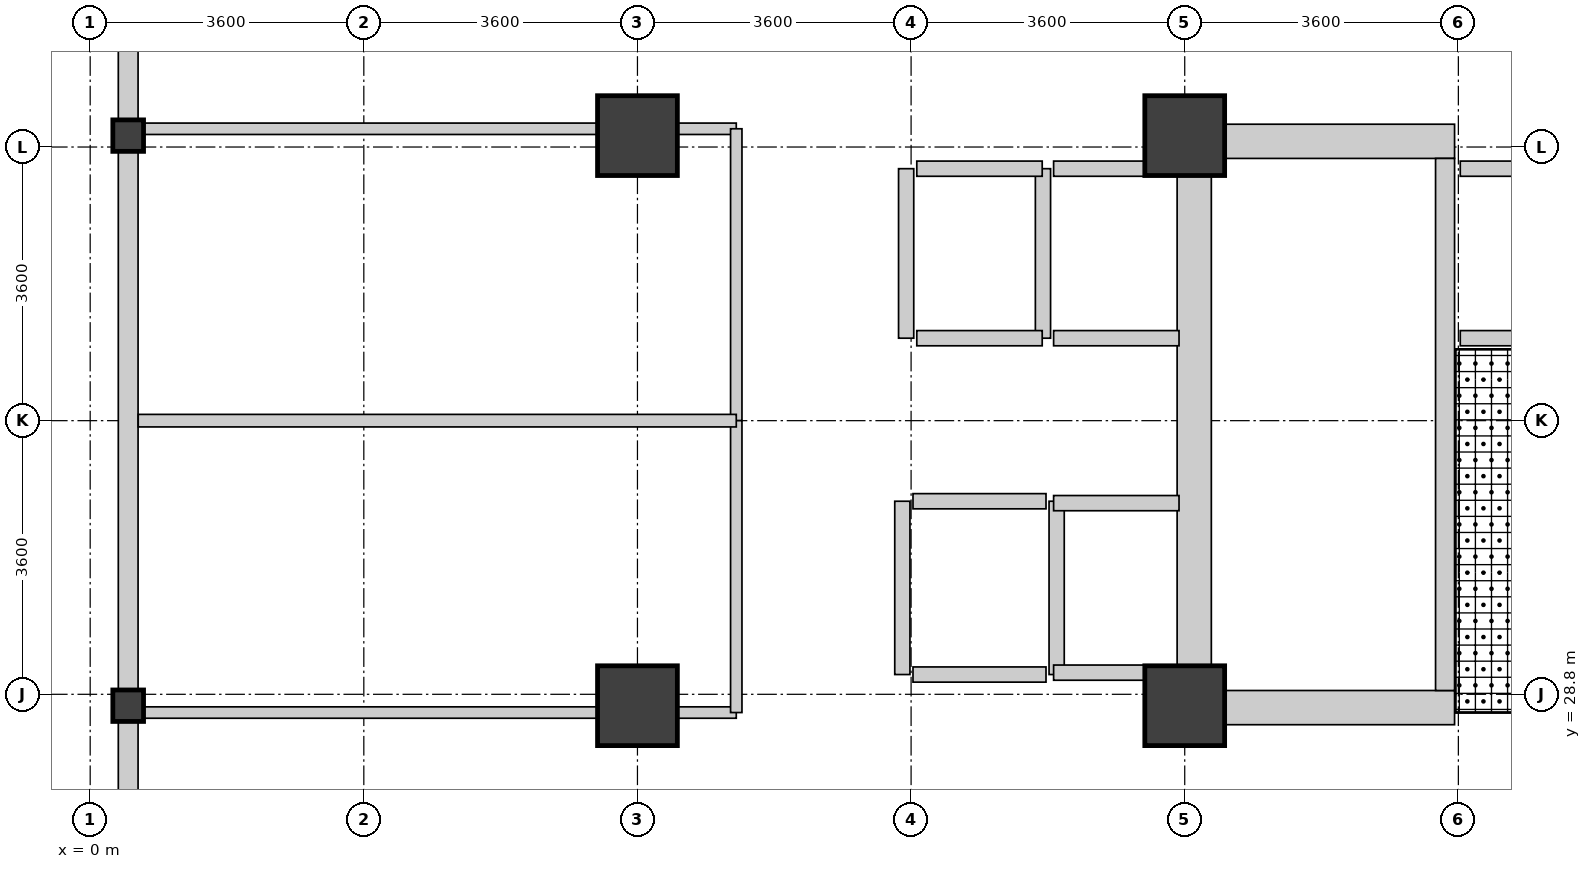
"""IFC4 building model, lengths in metres.
Left out: names, types, materials, properties, quantities, classifications, styles, units other than length and angle.
Written with IfcOpenShell. Run it as: python <this file> out.ifc"""

import sys

from ifc_helpers import new_model, si_unit, direction, frame, frame_2d, origin, origin_2d, place, context, subcontext, project, spatial, rectangle, i_section, extrude, source, transform, mapped, element, fill, save


model = new_model("IFC4")
c1 = context("Model", 3, precision=1e-05, world=origin(), true_north=direction((0.0, 1.0)))
c2 = subcontext(c1, "Body", "Model", "MODEL_VIEW")
j1 = project(units=[si_unit("LENGTHUNIT", "METRE"), si_unit("PLANEANGLEUNIT", "RADIAN")], contexts=[c1])
p1 = place(None, origin())
s1 = spatial("IfcSite", under=j1, at=p1, CompositionType="ELEMENT")
p2 = place(p1, origin())
s2 = spatial("IfcBuilding", under=s1, at=p2, CompositionType="ELEMENT")
p3 = place(p2, frame((0.0, 0.0, 135.6)))
s3 = spatial("IfcBuildingStorey", under=s2, at=p3, CompositionType="ELEMENT", Elevation=135.6)
p4 = place(p3, frame((14.525, 28.4, 0.0), z_axis=(0.0, 0.0, 1.0), x_axis=(0.0, 1.0, 0.0)))
e1 = element("IfcWall", 1, at=p4, inside=s3, PredefinedType="SHEAR", context=c2, shape_type="SweptSolid", body=[
    extrude(rectangle(XDim=7.9, YDim=0.45, at=frame_2d((3.95, 0.0))), origin(), (0.0, 0.0, 1.0), 4.36),
])
for number, where, z_axis, x_axis in (
    (2, (14.75, 28.625, 0.0), (0.0, 0.0, 1.0), (1.0, 0.0, 0.0)),
    (3, (14.75, 36.075, 0.0), (0.0, 0.0, 1.0), (1.0, 0.0, 0.0)),
):
    element("IfcWall", number, at=place(p3, frame(where, z_axis=z_axis, x_axis=x_axis)), inside=s3, PredefinedType="SHEAR", context=c2, shape_type="SweptSolid", body=[
        extrude(rectangle(XDim=3.2, YDim=0.45, at=frame_2d((1.6, 0.0))), origin(), (0.0, 0.0, 1.0), 4.36),
    ])
p5 = place(p3, frame((17.825, 28.85, 0.0), z_axis=(0.0, 0.0, 1.0), x_axis=(0.0, 1.0, 0.0)))
e4 = element("IfcWall", 4, at=p5, inside=s3, PredefinedType="SHEAR", context=c2, shape_type="SweptSolid", body=[
    extrude(rectangle(XDim=7.0, YDim=0.25, at=frame_2d((3.5, 0.0))), origin(), (0.0, 0.0, 1.0), 4.36),
])
p6 = place(p5, frame((0.15, 0.0, 0.0)))
e5 = element("IfcOpeningElement", 5, at=p6, cuts=e4, PredefinedType="OPENING", context=c2, shape_type="SweptSolid", body=[
    extrude(rectangle(XDim=1.1, YDim=2.08, at=frame_2d((0.55, 1.04))), frame((0.0, 0.135, 0.0), z_axis=(0.0, -1.0, 0.0), x_axis=(1.0, 0.0, 0.0)), (0.0, 0.0, 1.0), 0.27),
])
m1 = source(origin(), c2, "Body", "SweptSolid", [
    extrude(rectangle(XDim=1.05, YDim=1.05, at=origin_2d()), origin(), (0.0, 0.0, 1.0), 4.6),
])
for number, where, z_axis, x_axis in (
    (6, (7.2, 28.65, 0.0), (0.0, 0.0, 1.0), (1.0, 0.0, 0.0)),
    (7, (7.2, 36.15, 0.0), (0.0, 0.0, 1.0), (1.0, 0.0, 0.0)),
    (8, (14.4, 28.65, 0.0), (0.0, 0.0, 1.0), (1.0, 0.0, 0.0)),
    (9, (14.4, 36.15, 0.0), (0.0, 0.0, 1.0), (1.0, 0.0, 0.0)),
):
    element("IfcColumn", number, at=place(p3, frame(where, z_axis=z_axis, x_axis=x_axis)), inside=s3, PredefinedType="COLUMN", context=c2, shape_type="MappedRepresentation", body=[
        mapped(m1, transform((0.0, 0.0, 0.0), x_axis=(1.0, 0.0, 0.0), y_axis=(0.0, 1.0, 0.0), z_axis=(0.0, 0.0, 1.0), scale=1.0)),
    ])
m2 = source(origin(), c2, "Body", "SweptSolid", [
    extrude(i_section(OverallWidth=0.404, OverallDepth=0.414, WebThickness=0.021, FlangeThickness=0.028, FilletRadius=0.015, at=origin_2d()), origin(), (0.0, 0.0, 1.0), 4.6),
])
for number, where, z_axis, x_axis in (
    (10, (0.5, 28.65, 0.0), (0.0, 0.0, 1.0), (1.0, 0.0, 0.0)),
    (11, (0.5, 36.15, 0.0), (0.0, 0.0, 1.0), (1.0, 0.0, 0.0)),
):
    element("IfcColumn", number, at=place(p3, frame(where, z_axis=z_axis, x_axis=x_axis)), inside=s3, PredefinedType="COLUMN", context=c2, shape_type="MappedRepresentation", body=[
        mapped(m2, transform((0.0, 0.0, 0.0), x_axis=(1.0, 0.0, 0.0), y_axis=(0.0, 1.0, 0.0), z_axis=(0.0, 0.0, 1.0), scale=1.0)),
    ])
p7 = place(p3, frame((0.5, 36.358, 0.0), z_axis=(0.0, 0.0, 1.0), x_axis=(0.0, 1.0, 0.0)))
e12 = element("IfcWall", 12, at=p7, inside=s3, PredefinedType="STANDARD", context=c2, shape_type="SweptSolid", body=[
    extrude(rectangle(XDim=6.972, YDim=0.26, at=frame_2d((3.486, 0.0))), origin(), (0.0, 0.0, 1.0), 4.34),
])
p8 = place(p7, frame((3.879, 0.0, 0.85)))
e13 = element("IfcOpeningElement", 13, at=p8, cuts=e12, PredefinedType="OPENING", context=c2, shape_type="SweptSolid", body=[
    extrude(rectangle(XDim=2.7, YDim=2.05, at=frame_2d((1.35, 1.025))), frame((0.0, 0.14, 0.0), z_axis=(0.0, -1.0, 0.0), x_axis=(1.0, 0.0, 0.0)), (0.0, 0.0, 1.0), 0.28),
])
p9 = place(p7, frame((2.453, 0.0, 0.85)))
e14 = element("IfcOpeningElement", 14, at=p9, cuts=e12, PredefinedType="OPENING", context=c2, shape_type="SweptSolid", body=[
    extrude(rectangle(XDim=0.95, YDim=1.75, at=frame_2d((0.475, 0.875))), frame((0.0, 0.14, 0.0), z_axis=(0.0, -1.0, 0.0), x_axis=(1.0, 0.0, 0.0)), (0.0, 0.0, 1.0), 0.28),
])
p10 = place(p3, frame((0.5, 28.858, 0.0), z_axis=(0.0, 0.0, 1.0), x_axis=(0.0, 1.0, 0.0)))
e15 = element("IfcWall", 15, at=p10, inside=s3, PredefinedType="STANDARD", context=c2, shape_type="SweptSolid", body=[
    extrude(rectangle(XDim=7.084, YDim=0.26, at=frame_2d((3.542, 0.0))), origin(), (0.0, 0.0, 1.0), 3.89),
])
p11 = place(p10, frame((0.421, 0.0, 0.85)))
e16 = element("IfcOpeningElement", 16, at=p11, cuts=e15, PredefinedType="OPENING", context=c2, shape_type="SweptSolid", body=[
    extrude(rectangle(XDim=2.7, YDim=2.05, at=frame_2d((1.35, 1.025))), frame((0.0, 0.14, 0.0), z_axis=(0.0, -1.0, 0.0), x_axis=(1.0, 0.0, 0.0)), (0.0, 0.0, 1.0), 0.28),
])
p12 = place(p10, frame((3.963, 0.0, 0.85)))
e17 = element("IfcOpeningElement", 17, at=p12, cuts=e15, PredefinedType="OPENING", context=c2, shape_type="SweptSolid", body=[
    extrude(rectangle(XDim=2.7, YDim=2.05, at=frame_2d((1.35, 1.025))), frame((0.0, 0.14, 0.0), z_axis=(0.0, -1.0, 0.0), x_axis=(1.0, 0.0, 0.0)), (0.0, 0.0, 1.0), 0.28),
])
p13 = place(p3, frame((0.5, 21.47, 0.0), z_axis=(0.0, 0.0, 1.0), x_axis=(0.0, 1.0, 0.0)))
e18 = element("IfcWall", 18, at=p13, inside=s3, PredefinedType="STANDARD", context=c2, shape_type="SweptSolid", body=[
    extrude(rectangle(XDim=6.972, YDim=0.26, at=frame_2d((3.486, 0.0))), origin(), (0.0, 0.0, 1.0), 4.34),
])
p14 = place(p13, frame((0.393, 0.0, 0.85)))
e19 = element("IfcOpeningElement", 19, at=p14, cuts=e18, PredefinedType="OPENING", context=c2, shape_type="SweptSolid", body=[
    extrude(rectangle(XDim=2.7, YDim=2.05, at=frame_2d((1.35, 1.025))), frame((0.0, 0.14, 0.0), z_axis=(0.0, -1.0, 0.0), x_axis=(1.0, 0.0, 0.0)), (0.0, 0.0, 1.0), 0.28),
])
p15 = place(p13, frame((3.569, 0.0, 0.85)))
e20 = element("IfcOpeningElement", 20, at=p15, cuts=e18, PredefinedType="OPENING", context=c2, shape_type="SweptSolid", body=[
    extrude(rectangle(XDim=0.95, YDim=1.75, at=frame_2d((0.475, 0.875))), frame((0.0, 0.14, 0.0), z_axis=(0.0, -1.0, 0.0), x_axis=(1.0, 0.0, 0.0)), (0.0, 0.0, 1.0), 0.28),
])
p16 = place(p3, frame((18.025, 33.485, 0.0), z_axis=(0.0, 0.0, 1.0), x_axis=(1.0, 0.0, 0.0)))
e21 = element("IfcWall", 21, at=p16, inside=s3, PredefinedType="PARTITIONING", context=c2, shape_type="SweptSolid", body=[
    extrude(rectangle(XDim=1.65, YDim=0.2, at=frame_2d((0.825, 0.0))), origin(), (0.0, 0.0, 1.0), 4.34),
])
p17 = place(p16, frame((0.275, 0.0, 0.0)))
e22 = element("IfcOpeningElement", 22, at=p17, cuts=e21, PredefinedType="OPENING", context=c2, shape_type="SweptSolid", body=[
    extrude(rectangle(XDim=1.1, YDim=2.12, at=frame_2d((0.55, 1.06))), frame((0.0, 0.11, 0.0), z_axis=(0.0, -1.0, 0.0), x_axis=(1.0, 0.0, 0.0)), (0.0, 0.0, 1.0), 0.22),
])
p18 = place(p3, frame((18.025, 35.715, 0.0), z_axis=(0.0, 0.0, 1.0), x_axis=(1.0, 0.0, 0.0)))
e23 = element("IfcWall", 23, at=p18, inside=s3, PredefinedType="PARTITIONING", context=c2, shape_type="SweptSolid", body=[
    extrude(rectangle(XDim=1.65, YDim=0.2, at=frame_2d((0.825, 0.0))), origin(), (0.0, 0.0, 1.0), 3.34),
])
p19 = place(p3, frame((10.825, 29.06, 0.0), z_axis=(0.0, 0.0, 1.0), x_axis=(1.0, 0.0, 0.0)))
e24 = element("IfcWall", 24, at=p19, inside=s3, PredefinedType="PARTITIONING", context=c2, shape_type="SweptSolid", body=[
    extrude(rectangle(XDim=1.75, YDim=0.2, at=frame_2d((0.875, 0.0))), origin(), (0.0, 0.0, 1.0), 4.34),
])
p20 = place(p3, frame((10.825, 31.34, 0.0), z_axis=(0.0, 0.0, 1.0), x_axis=(1.0, 0.0, 0.0)))
e25 = element("IfcWall", 25, at=p20, inside=s3, PredefinedType="PARTITIONING", context=c2, shape_type="SweptSolid", body=[
    extrude(rectangle(XDim=1.75, YDim=0.2, at=frame_2d((0.875, 0.0))), origin(), (0.0, 0.0, 1.0), 4.34),
])
p21 = place(p20, frame((0.325, 0.0, 0.0)))
e26 = element("IfcOpeningElement", 26, at=p21, cuts=e25, PredefinedType="OPENING", context=c2, shape_type="SweptSolid", body=[
    extrude(rectangle(XDim=1.1, YDim=2.12, at=frame_2d((0.55, 1.06))), frame((0.0, 0.11, 0.0), z_axis=(0.0, -1.0, 0.0), x_axis=(1.0, 0.0, 0.0)), (0.0, 0.0, 1.0), 0.22),
])
for number, where, z_axis, x_axis in (
    (27, (10.685, 29.06, 0.0), (0.0, 0.0, 1.0), (0.0, 1.0, 0.0)),
    (28, (12.715, 29.06, 0.0), (0.0, 0.0, 1.0), (0.0, 1.0, 0.0)),
):
    element("IfcWall", number, at=place(p3, frame(where, z_axis=z_axis, x_axis=x_axis)), inside=s3, PredefinedType="PARTITIONING", context=c2, shape_type="SweptSolid", body=[
        extrude(rectangle(XDim=2.28, YDim=0.2, at=frame_2d((1.14, 0.0))), origin(), (0.0, 0.0, 1.0), 4.34),
    ])
p22 = place(p3, frame((12.675, 33.485, 0.0), z_axis=(0.0, 0.0, 1.0), x_axis=(1.0, 0.0, 0.0)))
e29 = element("IfcWall", 29, at=p22, inside=s3, PredefinedType="PARTITIONING", context=c2, shape_type="SweptSolid", body=[
    extrude(rectangle(XDim=1.65, YDim=0.2, at=frame_2d((0.825, 0.0))), origin(), (0.0, 0.0, 1.0), 4.34),
])
p23 = place(p22, frame((0.275, 0.0, 0.0)))
e30 = element("IfcOpeningElement", 30, at=p23, cuts=e29, PredefinedType="OPENING", context=c2, shape_type="SweptSolid", body=[
    extrude(rectangle(XDim=1.1, YDim=2.12, at=frame_2d((0.55, 1.06))), frame((0.0, 0.11, 0.0), z_axis=(0.0, -1.0, 0.0), x_axis=(1.0, 0.0, 0.0)), (0.0, 0.0, 1.0), 0.22),
])
p24 = place(p3, frame((12.675, 35.715, 0.0), z_axis=(0.0, 0.0, 1.0), x_axis=(1.0, 0.0, 0.0)))
e31 = element("IfcWall", 31, at=p24, inside=s3, PredefinedType="PARTITIONING", context=c2, shape_type="SweptSolid", body=[
    extrude(rectangle(XDim=1.65, YDim=0.2, at=frame_2d((0.825, 0.0))), origin(), (0.0, 0.0, 1.0), 4.34),
])
p25 = place(p3, frame((12.535, 33.485, 0.0), z_axis=(0.0, 0.0, 1.0), x_axis=(0.0, 1.0, 0.0)))
e32 = element("IfcWall", 32, at=p25, inside=s3, PredefinedType="PARTITIONING", context=c2, shape_type="SweptSolid", body=[
    extrude(rectangle(XDim=2.23, YDim=0.2, at=frame_2d((1.115, 0.0))), origin(), (0.0, 0.0, 1.0), 4.34),
])
p26 = place(p3, frame((12.675, 29.085, 0.0), z_axis=(0.0, 0.0, 1.0), x_axis=(1.0, 0.0, 0.0)))
e33 = element("IfcWall", 33, at=p26, inside=s3, PredefinedType="PARTITIONING", context=c2, shape_type="SweptSolid", body=[
    extrude(rectangle(XDim=1.65, YDim=0.2, at=frame_2d((0.825, 0.0))), origin(), (0.0, 0.0, 1.0), 4.34),
])
p27 = place(p3, frame((12.675, 31.315, 0.0), z_axis=(0.0, 0.0, 1.0), x_axis=(1.0, 0.0, 0.0)))
e34 = element("IfcWall", 34, at=p27, inside=s3, PredefinedType="PARTITIONING", context=c2, shape_type="SweptSolid", body=[
    extrude(rectangle(XDim=1.65, YDim=0.2, at=frame_2d((0.825, 0.0))), origin(), (0.0, 0.0, 1.0), 4.34),
])
p28 = place(p27, frame((0.275, 0.0, 0.0)))
e35 = element("IfcOpeningElement", 35, at=p28, cuts=e34, PredefinedType="OPENING", context=c2, shape_type="SweptSolid", body=[
    extrude(rectangle(XDim=1.1, YDim=2.12, at=frame_2d((0.55, 1.06))), frame((0.0, 0.11, 0.0), z_axis=(0.0, -1.0, 0.0), x_axis=(1.0, 0.0, 0.0)), (0.0, 0.0, 1.0), 0.22),
])
p29 = place(p3, frame((10.875, 33.485, 0.0), z_axis=(0.0, 0.0, 1.0), x_axis=(1.0, 0.0, 0.0)))
e36 = element("IfcWall", 36, at=p29, inside=s3, PredefinedType="PARTITIONING", context=c2, shape_type="SweptSolid", body=[
    extrude(rectangle(XDim=1.65, YDim=0.2, at=frame_2d((0.825, 0.0))), origin(), (0.0, 0.0, 1.0), 4.34),
])
p30 = place(p29, frame((0.275, 0.0, 0.0)))
e37 = element("IfcOpeningElement", 37, at=p30, cuts=e36, PredefinedType="OPENING", context=c2, shape_type="SweptSolid", body=[
    extrude(rectangle(XDim=1.1, YDim=2.12, at=frame_2d((0.55, 1.06))), frame((0.0, 0.11, 0.0), z_axis=(0.0, -1.0, 0.0), x_axis=(1.0, 0.0, 0.0)), (0.0, 0.0, 1.0), 0.22),
])
p31 = place(p3, frame((10.875, 35.715, 0.0), z_axis=(0.0, 0.0, 1.0), x_axis=(1.0, 0.0, 0.0)))
e38 = element("IfcWall", 38, at=p31, inside=s3, PredefinedType="PARTITIONING", context=c2, shape_type="SweptSolid", body=[
    extrude(rectangle(XDim=1.65, YDim=0.2, at=frame_2d((0.825, 0.0))), origin(), (0.0, 0.0, 1.0), 4.34),
])
p32 = place(p3, frame((10.735, 33.485, 0.0), z_axis=(0.0, 0.0, 1.0), x_axis=(0.0, 1.0, 0.0)))
e39 = element("IfcWall", 39, at=p32, inside=s3, PredefinedType="PARTITIONING", context=c2, shape_type="SweptSolid", body=[
    extrude(rectangle(XDim=2.23, YDim=0.2, at=frame_2d((1.115, 0.0))), origin(), (0.0, 0.0, 1.0), 4.34),
])
p33 = place(p3, frame((0.702, 28.56, 0.0), z_axis=(0.0, 0.0, 1.0), x_axis=(1.0, 0.0, 0.0)))
e40 = element("IfcWall", 40, at=p33, inside=s3, PredefinedType="PARTITIONING", context=c2, shape_type="SweptSolid", body=[
    extrude(rectangle(XDim=5.973, YDim=0.15, at=frame_2d((2.987, 0.0))), origin(), (0.0, 0.0, 1.0), 3.74),
])
p34 = place(p33, frame((2.336, 0.0, 0.0)))
e41 = element("IfcOpeningElement", 41, at=p34, cuts=e40, PredefinedType="OPENING", context=c2, shape_type="SweptSolid", body=[
    extrude(rectangle(XDim=1.3, YDim=2.12, at=frame_2d((0.65, 1.06))), frame((0.0, 0.085, 0.0), z_axis=(0.0, -1.0, 0.0), x_axis=(1.0, 0.0, 0.0)), (0.0, 0.0, 1.0), 0.17),
])
p35 = place(p3, frame((7.725, 28.56, 0.0), z_axis=(0.0, 0.0, 1.0), x_axis=(1.0, 0.0, 0.0)))
e42 = element("IfcWall", 42, at=p35, inside=s3, PredefinedType="PARTITIONING", context=c2, shape_type="SweptSolid", body=[
    extrude(rectangle(XDim=0.775, YDim=0.15, at=frame_2d((0.387, 0.0))), origin(), (0.0, 0.0, 1.0), 3.74),
])
p36 = place(p3, frame((0.702, 36.24, 0.0), z_axis=(0.0, 0.0, 1.0), x_axis=(1.0, 0.0, 0.0)))
e43 = element("IfcWall", 43, at=p36, inside=s3, PredefinedType="PARTITIONING", context=c2, shape_type="SweptSolid", body=[
    extrude(rectangle(XDim=5.973, YDim=0.15, at=frame_2d((2.987, 0.0))), origin(), (0.0, 0.0, 1.0), 3.74),
])
p37 = place(p36, frame((2.336, 0.0, 0.0)))
e44 = element("IfcOpeningElement", 44, at=p37, cuts=e43, PredefinedType="OPENING", context=c2, shape_type="SweptSolid", body=[
    extrude(rectangle(XDim=1.3, YDim=2.12, at=frame_2d((0.65, 1.06))), frame((0.0, 0.085, 0.0), z_axis=(0.0, -1.0, 0.0), x_axis=(1.0, 0.0, 0.0)), (0.0, 0.0, 1.0), 0.17),
])
p38 = place(p3, frame((7.725, 36.24, 0.0), z_axis=(0.0, 0.0, 1.0), x_axis=(1.0, 0.0, 0.0)))
e45 = element("IfcWall", 45, at=p38, inside=s3, PredefinedType="PARTITIONING", context=c2, shape_type="SweptSolid", body=[
    extrude(rectangle(XDim=0.775, YDim=0.15, at=frame_2d((0.387, 0.0))), origin(), (0.0, 0.0, 1.0), 3.74),
])
p39 = place(p3, frame((8.5, 32.4, 0.0), z_axis=(0.0, 0.0, 1.0), x_axis=(0.0, 1.0, 0.0)))
e46 = element("IfcWall", 46, at=p39, inside=s3, PredefinedType="PARTITIONING", context=c2, shape_type="SweptSolid", body=[
    extrude(rectangle(XDim=3.84, YDim=0.15, at=frame_2d((1.92, 0.0))), origin(), (0.0, 0.0, 1.0), 4.34),
])
p40 = place(p3, frame((8.5, 28.56, 0.0), z_axis=(0.0, 0.0, 1.0), x_axis=(0.0, 1.0, 0.0)))
e47 = element("IfcWall", 47, at=p40, inside=s3, PredefinedType="PARTITIONING", context=c2, shape_type="SweptSolid", body=[
    extrude(rectangle(XDim=3.84, YDim=0.15, at=frame_2d((1.92, 0.0))), origin(), (0.0, 0.0, 1.0), 4.34),
])
p41 = place(p3, frame((0.632, 32.4, 0.0), z_axis=(0.0, 0.0, 1.0), x_axis=(1.0, 0.0, 0.0)))
e48 = element("IfcWall", 48, at=p41, inside=s3, PredefinedType="PARTITIONING", context=c2, shape_type="SweptSolid", body=[
    extrude(rectangle(XDim=7.868, YDim=0.165, at=frame_2d((3.934, 0.0))), origin(), (0.0, 0.0, 1.0), 4.34),
])
p42 = place(p11, origin())
e49 = element("IfcWindow", 49, at=p42, inside=s3, PartitioningType="SINGLE_PANEL", PredefinedType="WINDOW", context=c2, shape_type="SweptSolid", body=[
    extrude(rectangle(XDim=2.7, YDim=2.05, at=frame_2d((1.35, 1.025))), frame((0.0, 0.03, 0.0), z_axis=(0.0, -1.0, 0.0), x_axis=(1.0, 0.0, 0.0)), (0.0, 0.0, 1.0), 0.06),
])
fill(e16, e49)
p43 = place(p12, origin())
e50 = element("IfcWindow", 50, at=p43, inside=s3, PartitioningType="SINGLE_PANEL", PredefinedType="WINDOW", context=c2, shape_type="SweptSolid", body=[
    extrude(rectangle(XDim=2.7, YDim=2.05, at=frame_2d((1.35, 1.025))), frame((0.0, 0.03, 0.0), z_axis=(0.0, -1.0, 0.0), x_axis=(1.0, 0.0, 0.0)), (0.0, 0.0, 1.0), 0.06),
])
fill(e17, e50)
p44 = place(p6, origin())
e51 = element("IfcDoor", 51, at=p44, inside=s3, OperationType="SINGLE_SWING_RIGHT", PredefinedType="DOOR", context=c2, shape_type="SweptSolid", body=[
    extrude(rectangle(XDim=1.1, YDim=2.08, at=frame_2d((0.55, 1.04))), frame((0.0, 0.025, 0.0), z_axis=(0.0, -1.0, 0.0), x_axis=(1.0, 0.0, 0.0)), (0.0, 0.0, 1.0), 0.05),
])
fill(e5, e51)
p45 = place(p17, origin())
e52 = element("IfcDoor", 52, at=p45, inside=s3, OperationType="SLIDING_TO_LEFT", PredefinedType="DOOR", context=c2, shape_type="SweptSolid", body=[
    extrude(rectangle(XDim=1.1, YDim=2.12, at=frame_2d((0.55, 1.06))), frame((0.0, 0.025, 0.0), z_axis=(0.0, -1.0, 0.0), x_axis=(1.0, 0.0, 0.0)), (0.0, 0.0, 1.0), 0.05),
])
fill(e22, e52)
p46 = place(p21, origin())
e53 = element("IfcDoor", 53, at=p46, inside=s3, OperationType="SLIDING_TO_LEFT", PredefinedType="DOOR", context=c2, shape_type="SweptSolid", body=[
    extrude(rectangle(XDim=1.1, YDim=2.12, at=frame_2d((0.55, 1.06))), frame((0.0, 0.025, 0.0), z_axis=(0.0, -1.0, 0.0), x_axis=(1.0, 0.0, 0.0)), (0.0, 0.0, 1.0), 0.05),
])
fill(e26, e53)
p47 = place(p23, origin())
e54 = element("IfcDoor", 54, at=p47, inside=s3, OperationType="SLIDING_TO_LEFT", PredefinedType="DOOR", context=c2, shape_type="SweptSolid", body=[
    extrude(rectangle(XDim=1.1, YDim=2.12, at=frame_2d((0.55, 1.06))), frame((0.0, 0.025, 0.0), z_axis=(0.0, -1.0, 0.0), x_axis=(1.0, 0.0, 0.0)), (0.0, 0.0, 1.0), 0.05),
])
fill(e30, e54)
p48 = place(p28, origin())
e55 = element("IfcDoor", 55, at=p48, inside=s3, OperationType="SLIDING_TO_LEFT", PredefinedType="DOOR", context=c2, shape_type="SweptSolid", body=[
    extrude(rectangle(XDim=1.1, YDim=2.12, at=frame_2d((0.55, 1.06))), frame((0.0, 0.025, 0.0), z_axis=(0.0, -1.0, 0.0), x_axis=(1.0, 0.0, 0.0)), (0.0, 0.0, 1.0), 0.05),
])
fill(e35, e55)
p49 = place(p30, origin())
e56 = element("IfcDoor", 56, at=p49, inside=s3, OperationType="SLIDING_TO_LEFT", PredefinedType="DOOR", context=c2, shape_type="SweptSolid", body=[
    extrude(rectangle(XDim=1.1, YDim=2.12, at=frame_2d((0.55, 1.06))), frame((0.0, 0.025, 0.0), z_axis=(0.0, -1.0, 0.0), x_axis=(1.0, 0.0, 0.0)), (0.0, 0.0, 1.0), 0.05),
])
fill(e37, e56)
p50 = place(p34, origin())
e57 = element("IfcDoor", 57, at=p50, inside=s3, OperationType="DOUBLE_DOOR_SINGLE_SWING", PredefinedType="DOOR", context=c2, shape_type="SweptSolid", body=[
    extrude(rectangle(XDim=1.3, YDim=2.12, at=frame_2d((0.65, 1.06))), frame((0.0, 0.025, 0.0), z_axis=(0.0, -1.0, 0.0), x_axis=(1.0, 0.0, 0.0)), (0.0, 0.0, 1.0), 0.05),
])
fill(e41, e57)
p51 = place(p37, origin())
e58 = element("IfcDoor", 58, at=p51, inside=s3, OperationType="DOUBLE_DOOR_SINGLE_SWING", PredefinedType="DOOR", context=c2, shape_type="SweptSolid", body=[
    extrude(rectangle(XDim=1.3, YDim=2.12, at=frame_2d((0.65, 1.06))), frame((0.0, 0.025, 0.0), z_axis=(0.0, -1.0, 0.0), x_axis=(1.0, 0.0, 0.0)), (0.0, 0.0, 1.0), 0.05),
])
fill(e44, e58)
save(model, sys.argv[1])
